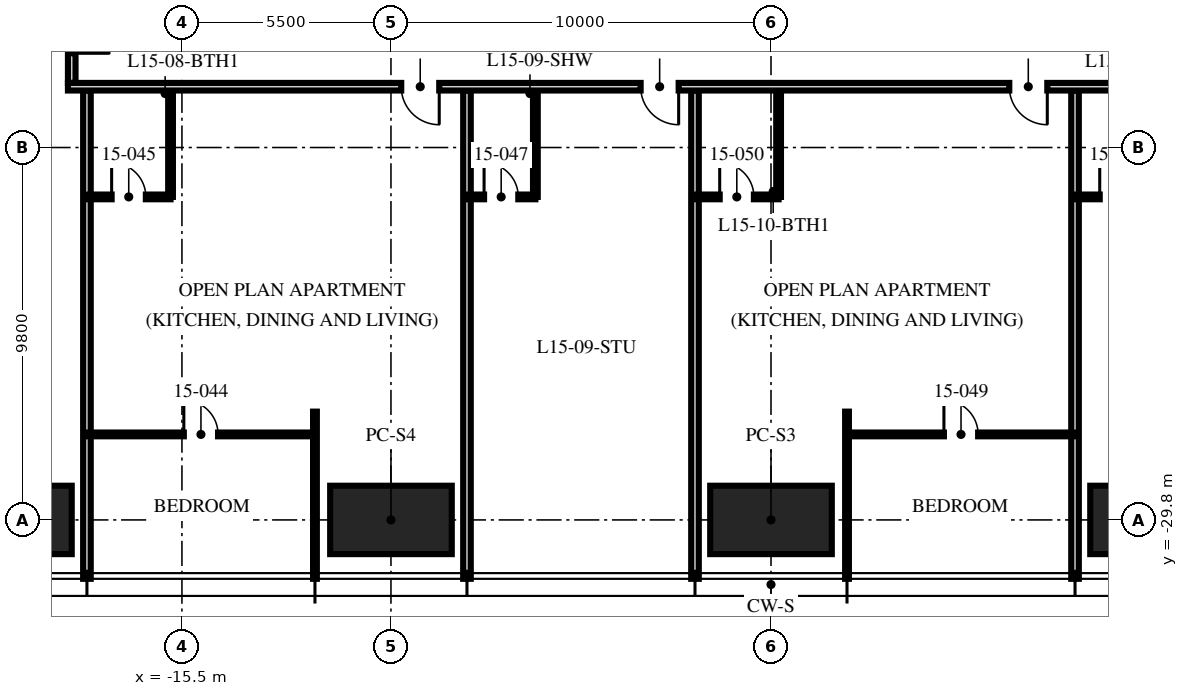
"""IFC4 building model, lengths in metres.
Left out: names, types, materials, properties, quantities, classifications, styles, units other than length and angle.
Written with IfcOpenShell. Run it as: python <this file> out.ifc"""

import sys

from ifc_helpers import new_model, si_unit, direction, frame, frame_2d, origin, origin_2d, place, context, subcontext, project, spatial, rectangle, hollow_rectangle, extrude, element, fill, save


model = new_model("IFC4")
c1 = context("Model", 3, precision=1e-05, world=origin(), true_north=direction((0.0, 1.0)))
c2 = subcontext(c1, "Body", "Model", "MODEL_VIEW")
j1 = project(units=[si_unit("LENGTHUNIT", "METRE"), si_unit("PLANEANGLEUNIT", "RADIAN")], contexts=[c1])
p1 = place(None, origin())
s1 = spatial("IfcSite", under=j1, at=p1, CompositionType="ELEMENT")
p2 = place(p1, origin())
s2 = spatial("IfcBuilding", under=s1, at=p2, CompositionType="ELEMENT")
p3 = place(p2, frame((0.0, 0.0, 62.25)))
s3 = spatial("IfcBuildingStorey", under=s2, at=p3, CompositionType="ELEMENT", Elevation=62.25)
for number, where, z_axis, x_axis in (
    (1, (10.0, -29.8, 0.0), (0.0, 0.0, 1.0), (1.0, 0.0, 0.0)),
    (2, (0.0, -29.8, 0.0), (0.0, 0.0, 1.0), (1.0, 0.0, 0.0)),
    (3, (-10.0, -29.8, 0.0), (0.0, 0.0, 1.0), (1.0, 0.0, 0.0)),
    (4, (-20.0, -29.8, 0.0), (0.0, 0.0, 1.0), (1.0, 0.0, 0.0)),
):
    element("IfcColumn", number, at=place(p3, frame(where, z_axis=z_axis, x_axis=x_axis)), inside=s3, PredefinedType="COLUMN", context=c2, shape_type="SweptSolid", body=[
        extrude(hollow_rectangle(XDim=3.2, YDim=1.8, WallThickness=0.2, at=origin_2d()), origin(), (0.0, 0.0, 1.0), 3.75),
    ])
p4 = place(p3, frame((-18.0, -18.5, 0.0), z_axis=(0.0, 0.0, 1.0), x_axis=(0.0, -1.0, 0.0)))
e5 = element("IfcWall", 5, at=p4, inside=s3, PredefinedType="PARTITIONING", context=c2, shape_type="SweptSolid", body=[
    extrude(rectangle(XDim=12.85, YDim=0.2, at=frame_2d((6.425, 0.0))), origin(), (0.0, 0.0, 1.0), 2.3),
])
p5 = place(p3, frame((-12.0, -26.95, 0.0), z_axis=(0.0, 0.0, 1.0), x_axis=(0.0, -1.0, 0.0)))
e6 = element("IfcWall", 6, at=p5, inside=s3, PredefinedType="PARTITIONING", context=c2, shape_type="SweptSolid", body=[
    extrude(rectangle(XDim=4.4, YDim=0.1, at=frame_2d((2.2, 0.0))), origin(), (0.0, 0.0, 1.0), 2.71),
])
for number, where, z_axis, x_axis in (
    (7, (-8.0, -18.5, 0.0), (0.0, 0.0, 1.0), (0.0, -1.0, 0.0)),
    (8, (-2.0, -18.5, 0.0), (0.0, 0.0, 1.0), (0.0, -1.0, 0.0)),
):
    element("IfcWall", number, at=place(p3, frame(where, z_axis=z_axis, x_axis=x_axis)), inside=s3, PredefinedType="PARTITIONING", context=c2, shape_type="SweptSolid", body=[
        extrude(rectangle(XDim=12.85, YDim=0.2, at=frame_2d((6.425, 0.0))), origin(), (0.0, 0.0, 1.0), 2.71),
    ])
p6 = place(p3, frame((2.0, -26.95, 0.0), z_axis=(0.0, 0.0, 1.0), x_axis=(0.0, -1.0, 0.0)))
e9 = element("IfcWall", 9, at=p6, inside=s3, PredefinedType="PARTITIONING", context=c2, shape_type="SweptSolid", body=[
    extrude(rectangle(XDim=4.4, YDim=0.1, at=frame_2d((2.2, 0.0))), origin(), (0.0, 0.0, 1.0), 2.71),
])
p7 = place(p3, frame((8.0, -18.5, 0.0), z_axis=(0.0, 0.0, 1.0), x_axis=(0.0, -1.0, 0.0)))
e10 = element("IfcWall", 10, at=p7, inside=s3, PredefinedType="PARTITIONING", context=c2, shape_type="SweptSolid", body=[
    extrude(rectangle(XDim=12.85, YDim=0.2, at=frame_2d((6.425, 0.0))), origin(), (0.0, 0.0, 1.0), 2.71),
])
p8 = place(p3, frame((-18.0, -27.55, 0.0), z_axis=(0.0, 0.0, 1.0), x_axis=(1.0, 0.0, 0.0)))
e11 = element("IfcWall", 11, at=p8, inside=s3, PredefinedType="PARTITIONING", context=c2, shape_type="SweptSolid", body=[
    extrude(rectangle(XDim=6.0, YDim=0.1, at=frame_2d((3.0, 0.0))), origin(), (0.0, 0.0, 1.0), 2.61),
])
p9 = place(p8, frame((2.55, 0.0, 0.0)))
e12 = element("IfcOpeningElement", 12, at=p9, cuts=e11, PredefinedType="OPENING", context=c2, shape_type="SweptSolid", body=[
    extrude(rectangle(XDim=0.9, YDim=2.1, at=frame_2d((0.45, 1.05))), frame((0.0, 0.06, 0.0), z_axis=(0.0, -1.0, 0.0), x_axis=(1.0, 0.0, 0.0)), (0.0, 0.0, 1.0), 0.12),
])
p10 = place(p3, frame((-18.0, -21.3, 0.0), z_axis=(0.0, 0.0, 1.0), x_axis=(1.0, 0.0, 0.0)))
e13 = element("IfcWall", 13, at=p10, inside=s3, PredefinedType="PARTITIONING", context=c2, shape_type="SweptSolid", body=[
    extrude(rectangle(XDim=2.2, YDim=0.125, at=frame_2d((1.1, 0.0))), origin(), (0.0, 0.0, 1.0), 3.5),
])
p11 = place(p10, frame((0.65, 0.0, 0.0)))
e14 = element("IfcOpeningElement", 14, at=p11, cuts=e13, PredefinedType="OPENING", context=c2, shape_type="SweptSolid", body=[
    extrude(rectangle(XDim=0.9, YDim=2.1, at=frame_2d((0.45, 1.05))), frame((0.0, 0.073, 0.0), z_axis=(0.0, -1.0, 0.0), x_axis=(1.0, 0.0, 0.0)), (0.0, 0.0, 1.0), 0.145),
])
p12 = place(p3, frame((-15.8, -18.5, 0.0), z_axis=(0.0, 0.0, 1.0), x_axis=(0.0, -1.0, 0.0)))
e15 = element("IfcWall", 15, at=p12, inside=s3, PredefinedType="PARTITIONING", context=c2, shape_type="SweptSolid", body=[
    extrude(rectangle(XDim=2.8, YDim=0.125, at=frame_2d((1.4, 0.0))), origin(), (0.0, 0.0, 1.0), 3.5),
])
p13 = place(p3, frame((-8.0, -21.3, 0.0), z_axis=(0.0, 0.0, 1.0), x_axis=(1.0, 0.0, 0.0)))
e16 = element("IfcWall", 16, at=p13, inside=s3, PredefinedType="PARTITIONING", context=c2, shape_type="SweptSolid", body=[
    extrude(rectangle(XDim=1.8, YDim=0.125, at=frame_2d((0.9, 0.0))), origin(), (0.0, 0.0, 1.0), 3.5),
])
p14 = place(p13, frame((0.45, 0.0, 0.0)))
e17 = element("IfcOpeningElement", 17, at=p14, cuts=e16, PredefinedType="OPENING", context=c2, shape_type="SweptSolid", body=[
    extrude(rectangle(XDim=0.9, YDim=2.1, at=frame_2d((0.45, 1.05))), frame((0.0, 0.073, 0.0), z_axis=(0.0, -1.0, 0.0), x_axis=(1.0, 0.0, 0.0)), (0.0, 0.0, 1.0), 0.145),
])
p15 = place(p3, frame((-6.2, -18.5, 0.0), z_axis=(0.0, 0.0, 1.0), x_axis=(0.0, -1.0, 0.0)))
e18 = element("IfcWall", 18, at=p15, inside=s3, PredefinedType="PARTITIONING", context=c2, shape_type="SweptSolid", body=[
    extrude(rectangle(XDim=2.8, YDim=0.125, at=frame_2d((1.4, 0.0))), origin(), (0.0, 0.0, 1.0), 3.5),
])
p16 = place(p3, frame((2.0, -27.55, 0.0), z_axis=(0.0, 0.0, 1.0), x_axis=(1.0, 0.0, 0.0)))
e19 = element("IfcWall", 19, at=p16, inside=s3, PredefinedType="PARTITIONING", context=c2, shape_type="SweptSolid", body=[
    extrude(rectangle(XDim=6.0, YDim=0.1, at=frame_2d((3.0, 0.0))), origin(), (0.0, 0.0, 1.0), 2.61),
])
p17 = place(p16, frame((2.55, 0.0, 0.0)))
e20 = element("IfcOpeningElement", 20, at=p17, cuts=e19, PredefinedType="OPENING", context=c2, shape_type="SweptSolid", body=[
    extrude(rectangle(XDim=0.9, YDim=2.1, at=frame_2d((0.45, 1.05))), frame((0.0, 0.06, 0.0), z_axis=(0.0, -1.0, 0.0), x_axis=(1.0, 0.0, 0.0)), (0.0, 0.0, 1.0), 0.12),
])
p18 = place(p3, frame((-2.0, -21.3, 0.0), z_axis=(0.0, 0.0, 1.0), x_axis=(1.0, 0.0, 0.0)))
e21 = element("IfcWall", 21, at=p18, inside=s3, PredefinedType="PARTITIONING", context=c2, shape_type="SweptSolid", body=[
    extrude(rectangle(XDim=2.2, YDim=0.125, at=frame_2d((1.1, 0.0))), origin(), (0.0, 0.0, 1.0), 2.492),
])
p19 = place(p18, frame((0.65, 0.0, 0.0)))
e22 = element("IfcOpeningElement", 22, at=p19, cuts=e21, PredefinedType="OPENING", context=c2, shape_type="SweptSolid", body=[
    extrude(rectangle(XDim=0.9, YDim=2.1, at=frame_2d((0.45, 1.05))), frame((0.0, 0.073, 0.0), z_axis=(0.0, -1.0, 0.0), x_axis=(1.0, 0.0, 0.0)), (0.0, 0.0, 1.0), 0.145),
])
p20 = place(p3, frame((0.2, -18.5, 0.0), z_axis=(0.0, 0.0, 1.0), x_axis=(0.0, -1.0, 0.0)))
e23 = element("IfcWall", 23, at=p20, inside=s3, PredefinedType="PARTITIONING", context=c2, shape_type="SweptSolid", body=[
    extrude(rectangle(XDim=2.8, YDim=0.125, at=frame_2d((1.4, 0.0))), origin(), (0.0, 0.0, 1.0), 2.492),
])
p21 = place(p3, frame((8.0, -21.3, 0.0), z_axis=(0.0, 0.0, 1.0), x_axis=(1.0, 0.0, 0.0)))
e24 = element("IfcWall", 24, at=p21, inside=s3, PredefinedType="PARTITIONING", context=c2, shape_type="SweptSolid", body=[
    extrude(rectangle(XDim=2.2, YDim=0.125, at=frame_2d((1.1, 0.0))), origin(), (0.0, 0.0, 1.0), 2.492),
])
p22 = place(p21, frame((0.65, 0.0, 0.0)))
e25 = element("IfcOpeningElement", 25, at=p22, cuts=e24, PredefinedType="OPENING", context=c2, shape_type="SweptSolid", body=[
    extrude(rectangle(XDim=0.9, YDim=2.1, at=frame_2d((0.45, 1.05))), frame((0.0, 0.073, 0.0), z_axis=(0.0, -1.0, 0.0), x_axis=(1.0, 0.0, 0.0)), (0.0, 0.0, 1.0), 0.145),
])
p23 = place(p3, frame((-18.4, 6.0, 0.0), z_axis=(0.0, 0.0, 1.0), x_axis=(0.0, -1.0, 0.0)))
e26 = element("IfcWall", 26, at=p23, inside=s3, PredefinedType="PARTITIONING", context=c2, shape_type="SweptSolid", body=[
    extrude(rectangle(XDim=24.3, YDim=0.2, at=frame_2d((12.15, 0.0))), origin(), (0.0, 0.0, 1.0), 2.3),
])
p24 = place(p23, frame((22.52, 0.0, 0.0)))
e27 = element("IfcOpeningElement", 27, at=p24, cuts=e26, PredefinedType="OPENING", context=c2, shape_type="SweptSolid", body=[
    extrude(rectangle(XDim=1.0, YDim=2.2, at=frame_2d((0.5, 1.1))), frame((0.0, 0.11, 0.0), z_axis=(0.0, -1.0, 0.0), x_axis=(1.0, 0.0, 0.0)), (0.0, 0.0, 1.0), 0.22),
])
p25 = place(p3, frame((18.5, -18.4, 0.0), z_axis=(0.0, 0.0, 1.0), x_axis=(-1.0, 0.0, 0.0)))
e28 = element("IfcWall", 28, at=p25, inside=s3, PredefinedType="PARTITIONING", context=c2, shape_type="SweptSolid", body=[
    extrude(rectangle(XDim=37.0, YDim=0.2, at=frame_2d((18.5, 0.0))), origin(), (0.0, 0.0, 1.0), 2.3),
])
p26 = place(p25, frame((27.23, 0.0, 0.0)))
e29 = element("IfcOpeningElement", 29, at=p26, cuts=e28, PredefinedType="OPENING", context=c2, shape_type="SweptSolid", body=[
    extrude(rectangle(XDim=1.0, YDim=2.2, at=frame_2d((0.5, 1.1))), frame((0.0, 0.11, 0.0), z_axis=(0.0, -1.0, 0.0), x_axis=(1.0, 0.0, 0.0)), (0.0, 0.0, 1.0), 0.22),
])
p27 = place(p25, frame((20.93, 0.0, 0.0)))
e30 = element("IfcOpeningElement", 30, at=p27, cuts=e28, PredefinedType="OPENING", context=c2, shape_type="SweptSolid", body=[
    extrude(rectangle(XDim=1.0, YDim=2.2, at=frame_2d((0.5, 1.1))), frame((0.0, 0.11, 0.0), z_axis=(0.0, -1.0, 0.0), x_axis=(1.0, 0.0, 0.0)), (0.0, 0.0, 1.0), 0.22),
])
p28 = place(p25, frame((11.23, 0.0, 0.0)))
e31 = element("IfcOpeningElement", 31, at=p28, cuts=e28, PredefinedType="OPENING", context=c2, shape_type="SweptSolid", body=[
    extrude(rectangle(XDim=1.0, YDim=2.2, at=frame_2d((0.5, 1.1))), frame((0.0, 0.11, 0.0), z_axis=(0.0, -1.0, 0.0), x_axis=(1.0, 0.0, 0.0)), (0.0, 0.0, 1.0), 0.22),
])
p29 = place(p24, origin())
e32 = element("IfcDoor", 32, at=p29, inside=s3, OperationType="SINGLE_SWING_RIGHT", PredefinedType="DOOR", context=c2, shape_type="SweptSolid", body=[
    extrude(rectangle(XDim=1.0, YDim=2.2, at=frame_2d((0.5, 1.1))), frame((0.0, 0.025, 0.0), z_axis=(0.0, -1.0, 0.0), x_axis=(1.0, 0.0, 0.0)), (0.0, 0.0, 1.0), 0.05),
])
fill(e27, e32)
p30 = place(p9, origin())
e33 = element("IfcDoor", 33, at=p30, inside=s3, OperationType="SINGLE_SWING_LEFT", PredefinedType="DOOR", context=c2, shape_type="SweptSolid", body=[
    extrude(rectangle(XDim=0.9, YDim=2.1, at=frame_2d((0.45, 1.05))), frame((0.0, 0.025, 0.0), z_axis=(0.0, -1.0, 0.0), x_axis=(1.0, 0.0, 0.0)), (0.0, 0.0, 1.0), 0.05),
])
fill(e12, e33)
p31 = place(p11, origin())
e34 = element("IfcDoor", 34, at=p31, inside=s3, OperationType="SINGLE_SWING_LEFT", PredefinedType="DOOR", context=c2, shape_type="SweptSolid", body=[
    extrude(rectangle(XDim=0.9, YDim=2.1, at=frame_2d((0.45, 1.05))), frame((0.0, 0.025, 0.0), z_axis=(0.0, -1.0, 0.0), x_axis=(1.0, 0.0, 0.0)), (0.0, 0.0, 1.0), 0.05),
])
fill(e14, e34)
p32 = place(p26, origin())
e35 = element("IfcDoor", 35, at=p32, inside=s3, OperationType="SINGLE_SWING_LEFT", PredefinedType="DOOR", context=c2, shape_type="SweptSolid", body=[
    extrude(rectangle(XDim=1.0, YDim=2.2, at=frame_2d((0.5, 1.1))), frame((0.0, 0.025, 0.0), z_axis=(0.0, -1.0, 0.0), x_axis=(1.0, 0.0, 0.0)), (0.0, 0.0, 1.0), 0.05),
])
fill(e29, e35)
p33 = place(p14, origin())
e36 = element("IfcDoor", 36, at=p33, inside=s3, OperationType="SINGLE_SWING_LEFT", PredefinedType="DOOR", context=c2, shape_type="SweptSolid", body=[
    extrude(rectangle(XDim=0.9, YDim=2.1, at=frame_2d((0.45, 1.05))), frame((0.0, 0.025, 0.0), z_axis=(0.0, -1.0, 0.0), x_axis=(1.0, 0.0, 0.0)), (0.0, 0.0, 1.0), 0.05),
])
fill(e17, e36)
p34 = place(p27, origin())
e37 = element("IfcDoor", 37, at=p34, inside=s3, OperationType="SINGLE_SWING_LEFT", PredefinedType="DOOR", context=c2, shape_type="SweptSolid", body=[
    extrude(rectangle(XDim=1.0, YDim=2.2, at=frame_2d((0.5, 1.1))), frame((0.0, 0.025, 0.0), z_axis=(0.0, -1.0, 0.0), x_axis=(1.0, 0.0, 0.0)), (0.0, 0.0, 1.0), 0.05),
])
fill(e30, e37)
p35 = place(p17, origin())
e38 = element("IfcDoor", 38, at=p35, inside=s3, OperationType="SINGLE_SWING_LEFT", PredefinedType="DOOR", context=c2, shape_type="SweptSolid", body=[
    extrude(rectangle(XDim=0.9, YDim=2.1, at=frame_2d((0.45, 1.05))), frame((0.0, 0.025, 0.0), z_axis=(0.0, -1.0, 0.0), x_axis=(1.0, 0.0, 0.0)), (0.0, 0.0, 1.0), 0.05),
])
fill(e20, e38)
p36 = place(p19, origin())
e39 = element("IfcDoor", 39, at=p36, inside=s3, OperationType="SINGLE_SWING_LEFT", PredefinedType="DOOR", context=c2, shape_type="SweptSolid", body=[
    extrude(rectangle(XDim=0.9, YDim=2.1, at=frame_2d((0.45, 1.05))), frame((0.0, 0.025, 0.0), z_axis=(0.0, -1.0, 0.0), x_axis=(1.0, 0.0, 0.0)), (0.0, 0.0, 1.0), 0.05),
])
fill(e22, e39)
p37 = place(p28, origin())
e40 = element("IfcDoor", 40, at=p37, inside=s3, OperationType="SINGLE_SWING_LEFT", PredefinedType="DOOR", context=c2, shape_type="SweptSolid", body=[
    extrude(rectangle(XDim=1.0, YDim=2.2, at=frame_2d((0.5, 1.1))), frame((0.0, 0.025, 0.0), z_axis=(0.0, -1.0, 0.0), x_axis=(1.0, 0.0, 0.0)), (0.0, 0.0, 1.0), 0.05),
])
fill(e31, e40)
p38 = place(p22, origin())
e41 = element("IfcDoor", 41, at=p38, inside=s3, OperationType="SINGLE_SWING_LEFT", PredefinedType="DOOR", context=c2, shape_type="SweptSolid", body=[
    extrude(rectangle(XDim=0.9, YDim=2.1, at=frame_2d((0.45, 1.05))), frame((0.0, 0.025, 0.0), z_axis=(0.0, -1.0, 0.0), x_axis=(1.0, 0.0, 0.0)), (0.0, 0.0, 1.0), 0.05),
])
fill(e25, e41)
save(model, sys.argv[1])
